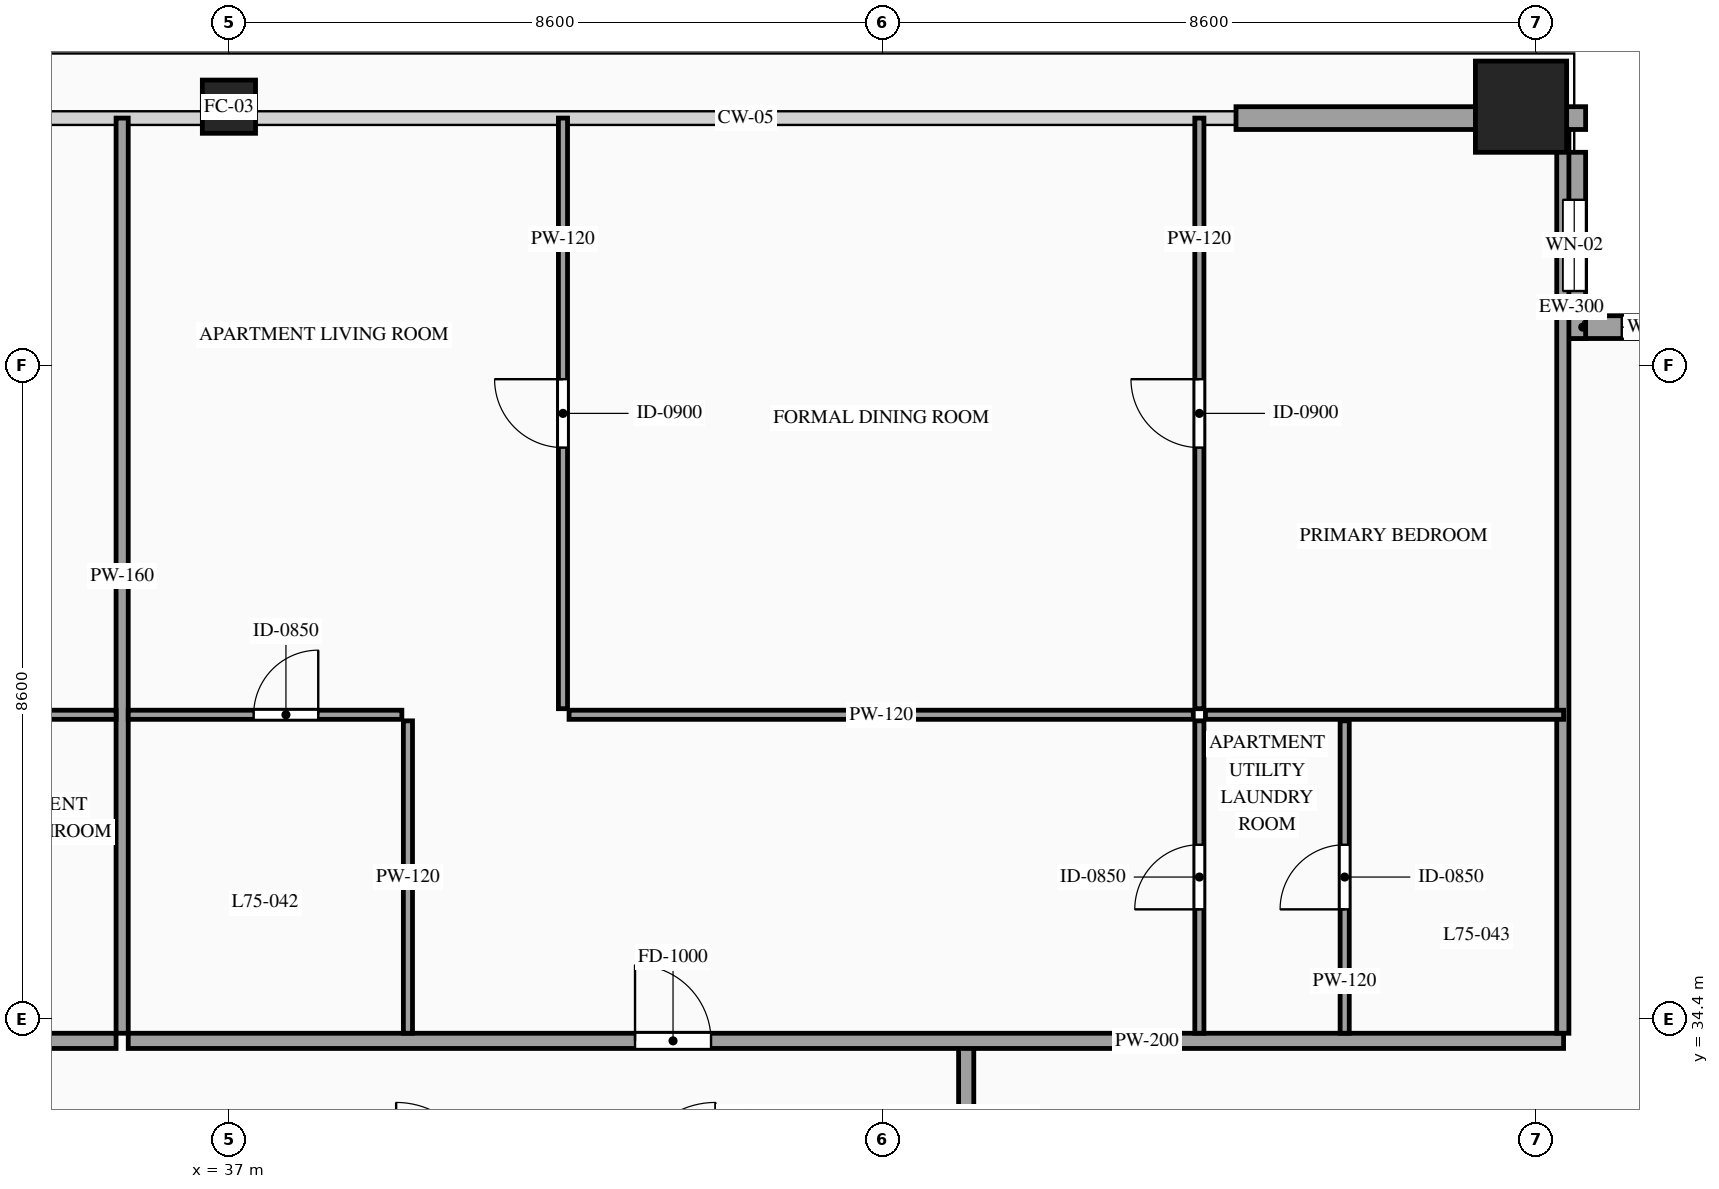
"""IFC4 building model, lengths in metres.
Left out: names, types, materials, properties, quantities, classifications, styles, units other than length and angle.
Written with IfcOpenShell. Run it as: python <this file> out.ifc"""

import sys

from ifc_helpers import new_model, si_unit, direction, frame, frame_2d, origin, origin_2d, place, context, subcontext, project, spatial, rectangle, hollow_rectangle, extrude, source, transform, mapped, element, fill, save


model = new_model("IFC4")
c1 = context("Model", 3, precision=1e-05, world=origin(), true_north=direction((0.0, 1.0)))
c2 = subcontext(c1, "Body", "Model", "MODEL_VIEW")
j1 = project(units=[si_unit("LENGTHUNIT", "METRE"), si_unit("PLANEANGLEUNIT", "RADIAN")], contexts=[c1])
p1 = place(None, origin())
s1 = spatial("IfcSite", under=j1, at=p1, CompositionType="ELEMENT")
p2 = place(p1, origin())
s2 = spatial("IfcBuilding", under=s1, at=p2, CompositionType="ELEMENT")
p3 = place(p2, frame((0.0, 0.0, 282.1)))
s3 = spatial("IfcBuildingStorey", under=s2, at=p3, CompositionType="ELEMENT", Elevation=282.1)
m1 = source(origin(), c2, "Body", "SweptSolid", [
    extrude(hollow_rectangle(XDim=0.7, YDim=0.7, WallThickness=0.032, at=origin_2d()), origin(), (0.0, 0.0, 1.0), 3.28),
])
p4 = place(p3, frame((37.0, 46.4, 0.0), z_axis=(0.0, 0.0, 1.0), x_axis=(1.0, 0.0, 0.0)))
e1 = element("IfcColumn", 1, at=p4, inside=s3, PredefinedType="COLUMN", context=c2, shape_type="MappedRepresentation", body=[
    mapped(m1, transform((0.0, 0.0, 0.0), scale=1.0)),
])
m2 = source(origin(), c2, "Body", "SweptSolid", [
    extrude(hollow_rectangle(XDim=1.2, YDim=1.2, WallThickness=0.055, at=origin_2d()), origin(), (0.0, 0.0, 1.0), 3.28),
])
p5 = place(p3, frame((54.0, 46.4, 0.0), z_axis=(0.0, 0.0, 1.0), x_axis=(1.0, 0.0, 0.0)))
e2 = element("IfcColumn", 2, at=p5, inside=s3, PredefinedType="COLUMN", context=c2, shape_type="MappedRepresentation", body=[
    mapped(m2, transform((0.0, 0.0, 0.0), scale=1.0)),
])
p6 = place(p3, frame((57.0, 43.5, 0.0), z_axis=(0.0, 0.0, 1.0), x_axis=(-1.0, 0.0, 0.0)))
e3 = element("IfcWall", 3, at=p6, inside=s3, PredefinedType="SOLIDWALL", context=c2, shape_type="SweptSolid", body=[
    extrude(rectangle(XDim=2.45, YDim=0.3, at=frame_2d((1.225, 0.0))), origin(), (0.0, 0.0, 1.0), 3.28),
])
p7 = place(p6, frame((0.775, 0.0, 0.85)))
e4 = element("IfcOpeningElement", 4, at=p7, cuts=e3, PredefinedType="OPENING", context=c2, shape_type="SweptSolid", body=[
    extrude(rectangle(XDim=0.9, YDim=1.5, at=frame_2d((0.45, 0.75))), frame((0.0, 0.165, 0.0), z_axis=(0.0, -1.0, 0.0), x_axis=(1.0, 0.0, 0.0)), (0.0, 0.0, 1.0), 0.33),
])
p8 = place(p3, frame((54.7, 43.35, 0.0), z_axis=(0.0, 0.0, 1.0), x_axis=(0.0, 1.0, 0.0)))
e5 = element("IfcWall", 5, at=p8, inside=s3, PredefinedType="SOLIDWALL", context=c2, shape_type="SweptSolid", body=[
    extrude(rectangle(XDim=2.45, YDim=0.3, at=frame_2d((1.225, 0.0))), origin(), (0.0, 0.0, 1.0), 3.28),
])
p9 = place(p8, frame((0.625, 0.0, 0.85)))
e6 = element("IfcOpeningElement", 6, at=p9, cuts=e5, PredefinedType="OPENING", context=c2, shape_type="SweptSolid", body=[
    extrude(rectangle(XDim=1.2, YDim=2.1, at=frame_2d((0.6, 1.05))), frame((0.0, 0.165, 0.0), z_axis=(0.0, -1.0, 0.0), x_axis=(1.0, 0.0, 0.0)), (0.0, 0.0, 1.0), 0.33),
])
m3 = source(origin(), c2, "Body", "SweptSolid", [
    extrude(rectangle(XDim=0.25, YDim=0.3, at=frame_2d((0.125, 0.0))), origin(), (0.0, 0.0, 1.0), 3.28),
])
p10 = place(p3, frame((54.6, 46.25, 0.0), z_axis=(0.0, 0.0, 1.0), x_axis=(1.0, 0.0, 0.0)))
e7 = element("IfcWall", 7, at=p10, inside=s3, PredefinedType="SOLIDWALL", context=c2, shape_type="MappedRepresentation", body=[
    mapped(m3, transform((0.0, 0.0, 0.0), scale=1.0)),
])
m4 = source(origin(), c2, "Body", "SweptSolid", [
    extrude(rectangle(XDim=3.15, YDim=0.3, at=frame_2d((1.575, 0.0))), origin(), (0.0, 0.0, 1.0), 2.835),
])
p11 = place(p3, frame((50.25, 46.25, 0.0), z_axis=(0.0, 0.0, 1.0), x_axis=(1.0, 0.0, 0.0)))
e8 = element("IfcWall", 8, at=p11, inside=s3, PredefinedType="SOLIDWALL", context=c2, shape_type="MappedRepresentation", body=[
    mapped(m4, transform((0.0, 0.0, 0.0), scale=1.0)),
])
m5 = source(origin(), c2, "Body", "SweptSolid", [
    extrude(rectangle(XDim=1.7, YDim=0.2, at=frame_2d((0.85, 0.0))), origin(), (0.0, 0.0, 1.0), 3.28),
])
p12 = place(p3, frame((46.7, 32.35, 0.0), z_axis=(0.0, 0.0, 1.0), x_axis=(0.0, 1.0, 0.0)))
e9 = element("IfcWall", 9, at=p12, inside=s3, PredefinedType="PARTITIONING", context=c2, shape_type="MappedRepresentation", body=[
    mapped(m5, transform((0.0, 0.0, 0.0), scale=1.0)),
])
p13 = place(p3, frame((19.44, 34.11, 0.0), z_axis=(0.0, 0.0, 1.0), x_axis=(1.0, 0.0, 0.0)))
e10 = element("IfcWall", 10, at=p13, inside=s3, PredefinedType="PARTITIONING", context=c2, shape_type="SweptSolid", body=[
    extrude(rectangle(XDim=16.075, YDim=0.2, at=frame_2d((8.038, 0.0))), origin(), (0.0, 0.0, 1.0), 3.28),
])
p14 = place(p13, frame((6.982, 0.0, 0.0)))
e11 = element("IfcOpeningElement", 11, at=p14, cuts=e10, PredefinedType="OPENING", context=c2, shape_type="SweptSolid", body=[
    extrude(rectangle(XDim=1.0, YDim=2.2, at=frame_2d((0.5, 1.1))), frame((0.0, 0.115, 0.0), z_axis=(0.0, -1.0, 0.0), x_axis=(1.0, 0.0, 0.0)), (0.0, 0.0, 1.0), 0.23),
])
m6 = source(origin(), c2, "Body", "SweptSolid", [
    extrude(rectangle(XDim=12.04, YDim=0.16, at=frame_2d((6.02, 0.0))), origin(), (0.0, 0.0, 1.0), 3.28),
])
p15 = place(p3, frame((35.595, 34.21, 0.0), z_axis=(0.0, 0.0, 1.0), x_axis=(0.0, 1.0, 0.0)))
e12 = element("IfcWall", 12, at=p15, inside=s3, PredefinedType="PARTITIONING", context=c2, shape_type="MappedRepresentation", body=[
    mapped(m6, transform((0.0, 0.0, 0.0), scale=1.0)),
])
m7 = source(origin(), c2, "Body", "SweptSolid", [
    extrude(rectangle(XDim=4.712, YDim=0.12, at=frame_2d((2.356, 0.0))), origin(), (0.0, 0.0, 1.0), 3.28),
])
p16 = place(p3, frame((30.803, 38.4, 0.0), z_axis=(0.0, 0.0, 1.0), x_axis=(1.0, 0.0, 0.0)))
e13 = element("IfcWall", 13, at=p16, inside=s3, PredefinedType="PARTITIONING", context=c2, shape_type="MappedRepresentation", body=[
    mapped(m7, transform((0.0, 0.0, 0.0), scale=1.0)),
])
p17 = place(p3, frame((35.675, 34.11, 0.0), z_axis=(0.0, 0.0, 1.0), x_axis=(1.0, 0.0, 0.0)))
e14 = element("IfcWall", 14, at=p17, inside=s3, PredefinedType="PARTITIONING", context=c2, shape_type="SweptSolid", body=[
    extrude(rectangle(XDim=18.885, YDim=0.2, at=frame_2d((9.442, 0.0))), origin(), (0.0, 0.0, 1.0), 3.28),
])
p18 = place(p17, frame((6.668, 0.0, 0.0)))
e15 = element("IfcOpeningElement", 15, at=p18, cuts=e14, PredefinedType="OPENING", context=c2, shape_type="SweptSolid", body=[
    extrude(rectangle(XDim=1.0, YDim=2.2, at=frame_2d((0.5, 1.1))), frame((0.0, 0.115, 0.0), z_axis=(0.0, -1.0, 0.0), x_axis=(1.0, 0.0, 0.0)), (0.0, 0.0, 1.0), 0.23),
])
m8 = source(origin(), c2, "Body", "SweptSolid", [
    extrude(rectangle(XDim=11.89, YDim=0.16, at=frame_2d((5.945, 0.0))), origin(), (0.0, 0.0, 1.0), 3.28),
])
p19 = place(p3, frame((54.55, 34.21, 0.0), z_axis=(0.0, 0.0, 1.0), x_axis=(0.0, 1.0, 0.0)))
e16 = element("IfcWall", 16, at=p19, inside=s3, PredefinedType="PARTITIONING", context=c2, shape_type="MappedRepresentation", body=[
    mapped(m8, transform((0.0, 0.0, 0.0), scale=1.0)),
])
p20 = place(p3, frame((35.675, 38.4, 0.0), z_axis=(0.0, 0.0, 1.0), x_axis=(1.0, 0.0, 0.0)))
e17 = element("IfcWall", 17, at=p20, inside=s3, PredefinedType="PARTITIONING", context=c2, shape_type="SweptSolid", body=[
    extrude(rectangle(XDim=3.6, YDim=0.12, at=frame_2d((1.8, 0.0))), origin(), (0.0, 0.0, 1.0), 3.28),
])
p21 = place(p20, frame((1.65, 0.0, 0.0)))
e18 = element("IfcOpeningElement", 18, at=p21, cuts=e17, PredefinedType="OPENING", context=c2, shape_type="SweptSolid", body=[
    extrude(rectangle(XDim=0.85, YDim=2.1, at=frame_2d((0.425, 1.05))), frame((0.0, 0.075, 0.0), z_axis=(0.0, -1.0, 0.0), x_axis=(1.0, 0.0, 0.0)), (0.0, 0.0, 1.0), 0.15),
])
m9 = source(origin(), c2, "Body", "SweptSolid", [
    extrude(rectangle(XDim=4.11, YDim=0.12, at=frame_2d((2.055, 0.0))), origin(), (0.0, 0.0, 1.0), 3.28),
])
p22 = place(p3, frame((39.355, 34.21, 0.0), z_axis=(0.0, 0.0, 1.0), x_axis=(0.0, 1.0, 0.0)))
e19 = element("IfcWall", 19, at=p22, inside=s3, PredefinedType="PARTITIONING", context=c2, shape_type="MappedRepresentation", body=[
    mapped(m9, transform((0.0, 0.0, 0.0), scale=1.0)),
])
p23 = place(p3, frame((51.68, 34.21, 0.0), z_axis=(0.0, 0.0, 1.0), x_axis=(0.0, 1.0, 0.0)))
e20 = element("IfcWall", 20, at=p23, inside=s3, PredefinedType="PARTITIONING", context=c2, shape_type="SweptSolid", body=[
    extrude(rectangle(XDim=4.11, YDim=0.12, at=frame_2d((2.055, 0.0))), origin(), (0.0, 0.0, 1.0), 3.28),
])
p24 = place(p23, frame((1.63, 0.0, 0.0)))
e21 = element("IfcOpeningElement", 21, at=p24, cuts=e20, PredefinedType="OPENING", context=c2, shape_type="SweptSolid", body=[
    extrude(rectangle(XDim=0.85, YDim=2.1, at=frame_2d((0.425, 1.05))), frame((0.0, 0.075, 0.0), z_axis=(0.0, -1.0, 0.0), x_axis=(1.0, 0.0, 0.0)), (0.0, 0.0, 1.0), 0.15),
])
m10 = source(origin(), c2, "Body", "SweptSolid", [
    extrude(rectangle(XDim=4.712, YDim=0.12, at=frame_2d((2.356, 0.0))), origin(), (0.0, 0.0, 1.0), 3.28),
])
p25 = place(p3, frame((49.848, 38.4, 0.0), z_axis=(0.0, 0.0, 1.0), x_axis=(1.0, 0.0, 0.0)))
e22 = element("IfcWall", 22, at=p25, inside=s3, PredefinedType="PARTITIONING", context=c2, shape_type="MappedRepresentation", body=[
    mapped(m10, transform((0.0, 0.0, 0.0), scale=1.0)),
])
p26 = place(p3, frame((49.768, 38.48, 0.0), z_axis=(0.0, 0.0, 1.0), x_axis=(0.0, 1.0, 0.0)))
e23 = element("IfcWall", 23, at=p26, inside=s3, PredefinedType="PARTITIONING", context=c2, shape_type="SweptSolid", body=[
    extrude(rectangle(XDim=7.77, YDim=0.12, at=frame_2d((3.885, 0.0))), origin(), (0.0, 0.0, 1.0), 3.28),
])
p27 = place(p26, frame((3.435, 0.0, 0.0)))
e24 = element("IfcOpeningElement", 24, at=p27, cuts=e23, PredefinedType="OPENING", context=c2, shape_type="SweptSolid", body=[
    extrude(rectangle(XDim=0.9, YDim=2.15, at=frame_2d((0.45, 1.075))), frame((0.0, 0.075, 0.0), z_axis=(0.0, -1.0, 0.0), x_axis=(1.0, 0.0, 0.0)), (0.0, 0.0, 1.0), 0.15),
])
p28 = place(p3, frame((49.768, 34.21, 0.0), z_axis=(0.0, 0.0, 1.0), x_axis=(0.0, 1.0, 0.0)))
e25 = element("IfcWall", 25, at=p28, inside=s3, PredefinedType="PARTITIONING", context=c2, shape_type="SweptSolid", body=[
    extrude(rectangle(XDim=4.11, YDim=0.12, at=frame_2d((2.055, 0.0))), origin(), (0.0, 0.0, 1.0), 3.28),
])
p29 = place(p28, frame((1.63, 0.0, 0.0)))
e26 = element("IfcOpeningElement", 26, at=p29, cuts=e25, PredefinedType="OPENING", context=c2, shape_type="SweptSolid", body=[
    extrude(rectangle(XDim=0.85, YDim=2.1, at=frame_2d((0.425, 1.05))), frame((0.0, 0.075, 0.0), z_axis=(0.0, -1.0, 0.0), x_axis=(1.0, 0.0, 0.0)), (0.0, 0.0, 1.0), 0.15),
])
m11 = source(origin(), c2, "Body", "SweptSolid", [
    extrude(rectangle(XDim=8.213, YDim=0.12, at=frame_2d((4.106, 0.0))), origin(), (0.0, 0.0, 1.0), 3.28),
])
p30 = place(p3, frame((41.475, 38.4, 0.0), z_axis=(0.0, 0.0, 1.0), x_axis=(1.0, 0.0, 0.0)))
e27 = element("IfcWall", 27, at=p30, inside=s3, PredefinedType="PARTITIONING", context=c2, shape_type="MappedRepresentation", body=[
    mapped(m11, transform((0.0, 0.0, 0.0), scale=1.0)),
])
p31 = place(p3, frame((41.395, 38.48, 0.0), z_axis=(0.0, 0.0, 1.0), x_axis=(0.0, 1.0, 0.0)))
e28 = element("IfcWall", 28, at=p31, inside=s3, PredefinedType="PARTITIONING", context=c2, shape_type="SweptSolid", body=[
    extrude(rectangle(XDim=7.77, YDim=0.12, at=frame_2d((3.885, 0.0))), origin(), (0.0, 0.0, 1.0), 3.28),
])
p32 = place(p31, frame((3.435, 0.0, 0.0)))
e29 = element("IfcOpeningElement", 29, at=p32, cuts=e28, PredefinedType="OPENING", context=c2, shape_type="SweptSolid", body=[
    extrude(rectangle(XDim=0.9, YDim=2.15, at=frame_2d((0.45, 1.075))), frame((0.0, 0.075, 0.0), z_axis=(0.0, -1.0, 0.0), x_axis=(1.0, 0.0, 0.0)), (0.0, 0.0, 1.0), 0.15),
])
m12 = source(origin(), c2, "Body", "SweptSolid", [
    extrude(rectangle(XDim=0.9, YDim=1.5, at=frame_2d((0.45, 0.75))), frame((0.0, 0.03, 0.0), z_axis=(0.0, -1.0, 0.0), x_axis=(1.0, 0.0, 0.0)), (0.0, 0.0, 1.0), 0.06),
])
p33 = place(p7, origin())
e30 = element("IfcWindow", 30, at=p33, inside=s3, PartitioningType="SINGLE_PANEL", PredefinedType="WINDOW", context=c2, shape_type="MappedRepresentation", body=[
    mapped(m12, transform((0.0, 0.0, 0.0), scale=1.0)),
])
fill(e4, e30)
m13 = source(origin(), c2, "Body", "SweptSolid", [
    extrude(rectangle(XDim=1.2, YDim=2.1, at=frame_2d((0.6, 1.05))), frame((0.0, 0.03, 0.0), z_axis=(0.0, -1.0, 0.0), x_axis=(1.0, 0.0, 0.0)), (0.0, 0.0, 1.0), 0.06),
])
p34 = place(p9, origin())
e31 = element("IfcWindow", 31, at=p34, inside=s3, PartitioningType="SINGLE_PANEL", PredefinedType="WINDOW", context=c2, shape_type="MappedRepresentation", body=[
    mapped(m13, transform((0.0, 0.0, 0.0), scale=1.0)),
])
fill(e6, e31)
m14 = source(origin(), c2, "Body", "SweptSolid", [
    extrude(rectangle(XDim=1.0, YDim=2.2, at=frame_2d((0.5, 1.1))), frame((0.0, 0.025, 0.0), z_axis=(0.0, -1.0, 0.0), x_axis=(1.0, 0.0, 0.0)), (0.0, 0.0, 1.0), 0.05),
])
p35 = place(p18, origin())
e32 = element("IfcDoor", 32, at=p35, inside=s3, OperationType="SINGLE_SWING_LEFT", PredefinedType="DOOR", context=c2, shape_type="MappedRepresentation", body=[
    mapped(m14, transform((0.0, 0.0, 0.0), scale=1.0)),
])
fill(e15, e32)
m15 = source(origin(), c2, "Body", "SweptSolid", [
    extrude(rectangle(XDim=0.85, YDim=2.1, at=frame_2d((0.425, 1.05))), frame((0.0, 0.025, 0.0), z_axis=(0.0, -1.0, 0.0), x_axis=(1.0, 0.0, 0.0)), (0.0, 0.0, 1.0), 0.05),
])
p36 = place(p21, origin())
e33 = element("IfcDoor", 33, at=p36, inside=s3, OperationType="SINGLE_SWING_RIGHT", PredefinedType="DOOR", context=c2, shape_type="MappedRepresentation", body=[
    mapped(m15, transform((0.0, 0.0, 0.0), scale=1.0)),
])
fill(e18, e33)
p37 = place(p24, origin())
e34 = element("IfcDoor", 34, at=p37, inside=s3, OperationType="SINGLE_SWING_LEFT", PredefinedType="DOOR", context=c2, shape_type="MappedRepresentation", body=[
    mapped(m15, transform((0.0, 0.0, 0.0), scale=1.0)),
])
fill(e21, e34)
m16 = source(origin(), c2, "Body", "SweptSolid", [
    extrude(rectangle(XDim=0.9, YDim=2.15, at=frame_2d((0.45, 1.075))), frame((0.0, 0.025, 0.0), z_axis=(0.0, -1.0, 0.0), x_axis=(1.0, 0.0, 0.0)), (0.0, 0.0, 1.0), 0.05),
])
p38 = place(p27, origin())
e35 = element("IfcDoor", 35, at=p38, inside=s3, OperationType="SINGLE_SWING_RIGHT", PredefinedType="DOOR", context=c2, shape_type="MappedRepresentation", body=[
    mapped(m16, transform((0.0, 0.0, 0.0), scale=1.0)),
])
fill(e24, e35)
p39 = place(p29, origin())
e36 = element("IfcDoor", 36, at=p39, inside=s3, OperationType="SINGLE_SWING_LEFT", PredefinedType="DOOR", context=c2, shape_type="MappedRepresentation", body=[
    mapped(m15, transform((0.0, 0.0, 0.0), scale=1.0)),
])
fill(e26, e36)
p40 = place(p32, origin())
e37 = element("IfcDoor", 37, at=p40, inside=s3, OperationType="SINGLE_SWING_RIGHT", PredefinedType="DOOR", context=c2, shape_type="MappedRepresentation", body=[
    mapped(m16, transform((0.0, 0.0, 0.0), scale=1.0)),
])
fill(e29, e37)
save(model, sys.argv[1])
